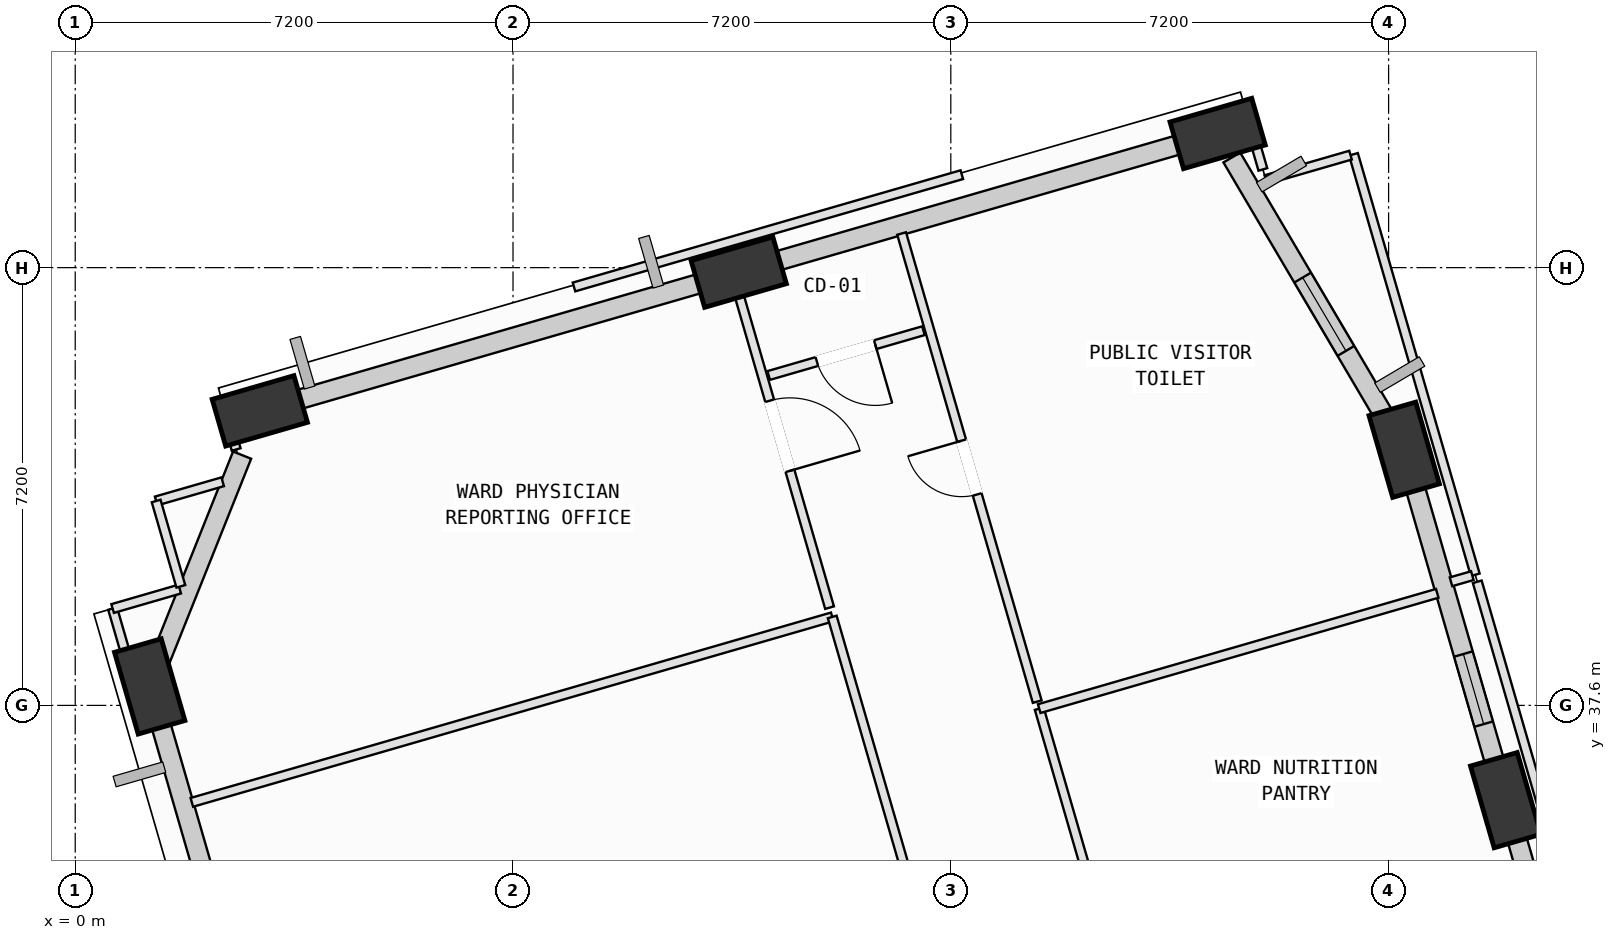
"""IFC4 building model, lengths in metres.
Left out: names, types, materials, properties, quantities, classifications, styles, units other than length and angle.
Written with IfcOpenShell. Run it as: python <this file> out.ifc"""

import sys

from ifc_helpers import new_model, si_unit, direction, frame, frame_2d, origin, origin_2d, place, context, subcontext, project, spatial, rectangle, extrude, element, fill, save


model = new_model("IFC4")
c1 = context("Model", 3, precision=1e-05, world=origin(), true_north=direction((0.0, 1.0)))
c2 = subcontext(c1, "Body", "Model", "MODEL_VIEW")
j1 = project(units=[si_unit("LENGTHUNIT", "METRE"), si_unit("PLANEANGLEUNIT", "RADIAN")], contexts=[c1])
p1 = place(None, origin())
s1 = spatial("IfcSite", under=j1, at=p1, CompositionType="ELEMENT")
p2 = place(p1, origin())
s2 = spatial("IfcBuilding", under=s1, at=p2, CompositionType="ELEMENT")
p3 = place(p2, frame((0.0, 0.0, 92.4)))
s3 = spatial("IfcBuildingStorey", under=s2, at=p3, CompositionType="ELEMENT", Elevation=92.4)
p4 = place(p3, frame((23.526, 36.041, 0.002), z_axis=(-0.046216520229, -0.042070447174, 0.998045144636), x_axis=(0.521685945625, 0.851022960879, 0.060030777066)))
e1 = element("IfcColumn", 1, at=p4, inside=s3, PredefinedType="COLUMN", context=c2, shape_type="SweptSolid", body=[
    extrude(rectangle(XDim=1.4, YDim=0.8, at=origin_2d()), origin(), (0.0, 0.0, 1.0), 4.004),
])
p5 = place(p3, frame((21.856, 41.804, 0.002), z_axis=(-0.069815910816, -0.049059829222, 0.996352784787), x_axis=(0.623114052348, 0.77782458417, 0.081962149972)))
e2 = element("IfcColumn", 2, at=p5, inside=s3, PredefinedType="COLUMN", context=c2, shape_type="SweptSolid", body=[
    extrude(rectangle(XDim=1.4, YDim=0.8, at=origin_2d()), origin(), (0.0, 0.0, 1.0), 4.011),
])
p6 = place(p3, frame((18.789, 47.006, 0.002), z_axis=(-0.091019912325, -0.061752669002, 0.993932584953), x_axis=(0.768058943677, -0.639647908294, 0.030594320596)))
e3 = element("IfcColumn", 3, at=p6, inside=s3, PredefinedType="COLUMN", context=c2, shape_type="SweptSolid", body=[
    extrude(rectangle(XDim=1.4, YDim=0.8, at=origin_2d()), origin(), (0.0, 0.0, 1.0), 4.021),
])
p7 = place(p3, frame((10.912, 44.726, 0.002), z_axis=(-0.081167514257, -0.094018532197, 0.992256191834), x_axis=(0.907432138666, -0.418775943189, 0.03454885123)))
e4 = element("IfcColumn", 4, at=p7, inside=s3, PredefinedType="COLUMN", context=c2, shape_type="SweptSolid", body=[
    extrude(rectangle(XDim=1.4, YDim=0.8, at=origin_2d()), origin(), (0.0, 0.0, 1.0), 4.028),
])
p8 = place(p3, frame((3.036, 42.445, 0.002), z_axis=(-0.071328120519, -0.125972714544, 0.989466105743), x_axis=(0.971456010571, -0.233777263949, 0.040266740449)))
e5 = element("IfcColumn", 5, at=p8, inside=s3, PredefinedType="COLUMN", context=c2, shape_type="SweptSolid", body=[
    extrude(rectangle(XDim=1.4, YDim=0.8, at=origin_2d()), origin(), (0.0, 0.0, 1.0), 4.039),
])
p9 = place(p3, frame((1.225, 37.912, 0.002), z_axis=(-0.052721586677, -0.133255019536, 0.989678500356), x_axis=(0.091085483074, 0.986283861971, 0.137650203007)))
e6 = element("IfcColumn", 6, at=p9, inside=s3, PredefinedType="COLUMN", context=c2, shape_type="SweptSolid", body=[
    extrude(rectangle(XDim=1.4, YDim=0.8, at=origin_2d()), origin(), (0.0, 0.0, 1.0), 4.038),
])
p10 = place(p3, frame((23.675, 35.524, 0.0), z_axis=(0.0, 0.0, 1.0), x_axis=(0.278160004848, -0.960534752991, 0.0)))
e7 = element("IfcWall", 7, at=p10, inside=s3, PredefinedType="SOLIDWALL", context=c2, shape_type="SweptSolid", body=[
    extrude(rectangle(XDim=6.223, YDim=0.32, at=frame_2d((3.111, 0.0))), origin(), (0.0, 0.0, 1.0), 3.165),
])
p11 = place(p10, frame((1.209, 0.0, 0.75)))
e8 = element("IfcOpeningElement", 8, at=p11, cuts=e7, PredefinedType="OPENING", context=c2, shape_type="SweptSolid", body=[
    extrude(rectangle(XDim=1.6, YDim=1.95, at=frame_2d((0.8, 0.975))), frame((0.0, 0.17, 0.0), z_axis=(0.0, -1.0, 0.0), x_axis=(1.0, 0.0, 0.0)), (0.0, 0.0, 1.0), 0.34),
])
p12 = place(p3, frame((22.003, 41.301, 0.0), z_axis=(0.0, 0.0, 1.0), x_axis=(0.278130894343, -0.960543182586, 0.0)))
e9 = element("IfcWall", 9, at=p12, inside=s3, PredefinedType="SOLIDWALL", context=c2, shape_type="SweptSolid", body=[
    extrude(rectangle(XDim=5.047, YDim=0.32, at=frame_2d((2.524, 0.0))), origin(), (0.0, 0.0, 1.0), 3.165),
])
p13 = place(p12, frame((2.973, 0.0, 0.75)))
e10 = element("IfcOpeningElement", 10, at=p13, cuts=e9, PredefinedType="OPENING", context=c2, shape_type="SweptSolid", body=[
    extrude(rectangle(XDim=1.2, YDim=1.75, at=frame_2d((0.6, 0.875))), frame((0.0, 0.17, 0.0), z_axis=(0.0, -1.0, 0.0), x_axis=(1.0, 0.0, 0.0)), (0.0, 0.0, 1.0), 0.34),
])
p14 = place(p3, frame((19.021, 46.612, 0.0), z_axis=(0.0, 0.0, 1.0), x_axis=(0.508026678392, -0.861341334223, 0.0)))
e11 = element("IfcWall", 11, at=p14, inside=s3, PredefinedType="SOLIDWALL", context=c2, shape_type="SweptSolid", body=[
    extrude(rectangle(XDim=5.129, YDim=0.32, at=frame_2d((2.564, 0.0))), origin(), (0.0, 0.0, 1.0), 3.165),
])
p15 = place(p14, frame((2.293, 0.0, 0.75)))
e12 = element("IfcOpeningElement", 12, at=p15, cuts=e11, PredefinedType="OPENING", context=c2, shape_type="SweptSolid", body=[
    extrude(rectangle(XDim=1.4, YDim=1.85, at=frame_2d((0.7, 0.925))), frame((0.0, 0.17, 0.0), z_axis=(0.0, -1.0, 0.0), x_axis=(1.0, 0.0, 0.0)), (0.0, 0.0, 1.0), 0.34),
])
p16 = place(p3, frame((11.169, 44.8, 0.0), z_axis=(0.0, 0.0, 1.0), x_axis=(0.960539342408, 0.278144156306, 0.0)))
e13 = element("IfcWall", 13, at=p16, inside=s3, PredefinedType="SOLIDWALL", context=c2, shape_type="SweptSolid", body=[
    extrude(rectangle(XDim=7.231, YDim=0.32, at=frame_2d((3.615, 0.0))), origin(), (0.0, 0.0, 1.0), 3.165),
])
p17 = place(p3, frame((3.269, 42.512, 0.0), z_axis=(0.0, 0.0, 1.0), x_axis=(0.960535698859, 0.278156738581, 0.0)))
e14 = element("IfcWall", 14, at=p17, inside=s3, PredefinedType="SOLIDWALL", context=c2, shape_type="SweptSolid", body=[
    extrude(rectangle(XDim=7.27, YDim=0.32, at=frame_2d((3.635, 0.0))), origin(), (0.0, 0.0, 1.0), 3.165),
])
p18 = place(p3, frame((1.302, 38.104, 0.0), z_axis=(0.0, 0.0, 1.0), x_axis=(0.371011883007, 0.928628118607, 0.0)))
e15 = element("IfcWall", 15, at=p18, inside=s3, PredefinedType="SOLIDWALL", context=c2, shape_type="SweptSolid", body=[
    extrude(rectangle(XDim=3.89, YDim=0.32, at=frame_2d((1.945, 0.0))), origin(), (0.0, 0.0, 1.0), 3.165),
])
p19 = place(p3, frame((2.935, 32.007, 0.0), z_axis=(0.0, 0.0, 1.0), x_axis=(-0.278171081154, 0.960531545349, 0.0)))
e16 = element("IfcWall", 16, at=p19, inside=s3, PredefinedType="SOLIDWALL", context=c2, shape_type="SweptSolid", body=[
    extrude(rectangle(XDim=5.456, YDim=0.32, at=frame_2d((2.728, 0.0))), origin(), (0.0, 0.0, 1.0), 3.165),
])
p20 = place(p19, frame((0.96, 0.0, 0.75)))
e17 = element("IfcOpeningElement", 17, at=p20, cuts=e16, PredefinedType="OPENING", context=c2, shape_type="SweptSolid", body=[
    extrude(rectangle(XDim=2.0, YDim=1.95, at=frame_2d((1.0, 0.975))), frame((0.0, 0.17, 0.0), z_axis=(0.0, -1.0, 0.0), x_axis=(1.0, 0.0, 0.0)), (0.0, 0.0, 1.0), 0.34),
])
p21 = place(p3, frame((1.918, 36.005, 0.0), z_axis=(0.0, 0.0, 1.0), x_axis=(0.960532175089, 0.278168906636, 0.0)))
e18 = element("IfcWall", 18, at=p21, inside=s3, PredefinedType="PARTITIONING", context=c2, shape_type="SweptSolid", body=[
    extrude(rectangle(XDim=10.965, YDim=0.15, at=frame_2d((5.482, 0.0))), origin(), (0.0, 0.0, 1.0), 3.78),
])
p22 = place(p3, frame((12.45, 39.055, 0.0), z_axis=(0.0, 0.0, 1.0), x_axis=(0.278173677599, -0.960530793411, 0.0)))
e19 = element("IfcWall", 19, at=p22, inside=s3, PredefinedType="PARTITIONING", context=c2, shape_type="SweptSolid", body=[
    extrude(rectangle(XDim=11.64, YDim=0.15, at=frame_2d((5.82, 0.0))), origin(), (0.0, 0.0, 1.0), 3.78),
])
p23 = place(p22, frame((5.22, 0.0, 0.0)))
e20 = element("IfcOpeningElement", 20, at=p23, cuts=e19, PredefinedType="OPENING", context=c2, shape_type="SweptSolid", body=[
    extrude(rectangle(XDim=1.2, YDim=2.15, at=frame_2d((0.6, 1.075))), frame((0.0, 0.085, 0.0), z_axis=(0.0, -1.0, 0.0), x_axis=(1.0, 0.0, 0.0)), (0.0, 0.0, 1.0), 0.17),
])
p24 = place(p3, frame((1.331, 40.962, 0.0), z_axis=(0.0, 0.0, 1.0), x_axis=(0.960686230917, 0.277636391216, 0.0)))
e21 = element("IfcWall", 21, at=p24, inside=s3, PredefinedType="PARTITIONING", context=c2, shape_type="SweptSolid", body=[
    extrude(rectangle(XDim=1.139, YDim=0.15, at=frame_2d((0.569, 0.0))), origin(), (0.0, 0.0, 1.0), 3.78),
])
p25 = place(p3, frame((2.647, 41.809, 0.0), z_axis=(0.0, 0.0, 1.0), x_axis=(-0.278075705732, 0.960559161052, 0.0)))
e22 = element("IfcWall", 22, at=p25, inside=s3, PredefinedType="PARTITIONING", context=c2, shape_type="SweptSolid", body=[
    extrude(rectangle(XDim=0.673, YDim=0.15, at=frame_2d((0.336, 0.0))), origin(), (0.0, 0.0, 1.0), 2.965),
])
p26 = place(p3, frame((2.46, 42.455, 0.0), z_axis=(0.0, 0.0, 1.0), x_axis=(0.960436547208, 0.278498902667, 0.0)))
e23 = element("IfcWall", 23, at=p26, inside=s3, PredefinedType="PARTITIONING", context=c2, shape_type="SweptSolid", body=[
    extrude(rectangle(XDim=0.793, YDim=0.15, at=frame_2d((0.397, 0.0))), origin(), (0.0, 0.0, 1.0), 3.78),
])
p27 = place(p3, frame((10.205, 44.698, 0.0), z_axis=(0.0, 0.0, 1.0), x_axis=(0.960640226242, 0.277795528628, 0.0)))
e24 = element("IfcWall", 24, at=p27, inside=s3, PredefinedType="PARTITIONING", context=c2, shape_type="SweptSolid", body=[
    extrude(rectangle(XDim=0.587, YDim=0.15, at=frame_2d((0.293, 0.0))), origin(), (0.0, 0.0, 1.0), 3.78),
])
p28 = place(p3, frame((10.769, 44.861, 0.0), z_axis=(0.0, 0.0, 1.0), x_axis=(0.278143692162, -0.96053947681, 0.0)))
e25 = element("IfcWall", 25, at=p28, inside=s3, PredefinedType="PARTITIONING", context=c2, shape_type="SweptSolid", body=[
    extrude(rectangle(XDim=5.885, YDim=0.15, at=frame_2d((2.943, 0.0))), origin(), (0.0, 0.0, 1.0), 2.965),
])
p29 = place(p28, frame((2.343, 0.0, 0.0)))
e26 = element("IfcOpeningElement", 26, at=p29, cuts=e25, PredefinedType="OPENING", context=c2, shape_type="SweptSolid", body=[
    extrude(rectangle(XDim=1.2, YDim=2.15, at=frame_2d((0.6, 1.075))), frame((0.0, 0.085, 0.0), z_axis=(0.0, -1.0, 0.0), x_axis=(1.0, 0.0, 0.0)), (0.0, 0.0, 1.0), 0.17),
])
p30 = place(p3, frame((1.197, 37.183, 0.0), z_axis=(0.0, 0.0, 1.0), x_axis=(-0.278140228785, 0.960540479694, 0.0)))
e27 = element("IfcWall", 27, at=p30, inside=s3, PredefinedType="PARTITIONING", context=c2, shape_type="SweptSolid", body=[
    extrude(rectangle(XDim=2.093, YDim=0.15, at=frame_2d((1.046, 0.0))), origin(), (0.0, 0.0, 1.0), 3.165),
])
p31 = place(p3, frame((0.615, 39.193, 0.0), z_axis=(0.0, 0.0, 1.0), x_axis=(0.960507511892, 0.278254055855, 0.0)))
e28 = element("IfcWall", 28, at=p31, inside=s3, PredefinedType="PARTITIONING", context=c2, shape_type="SweptSolid", body=[
    extrude(rectangle(XDim=1.149, YDim=0.15, at=frame_2d((0.575, 0.0))), origin(), (0.0, 0.0, 1.0), 3.78),
])
p32 = place(p3, frame((1.737, 39.558, 0.0), z_axis=(0.0, 0.0, 1.0), x_axis=(-0.277830901588, 0.960629996472, 0.0)))
e29 = element("IfcWall", 29, at=p32, inside=s3, PredefinedType="PARTITIONING", context=c2, shape_type="SweptSolid", body=[
    extrude(rectangle(XDim=1.461, YDim=0.15, at=frame_2d((0.731, 0.0))), origin(), (0.0, 0.0, 1.0), 3.78),
])
p33 = place(p3, frame((18.174, 29.536, 0.0), z_axis=(0.0, 0.0, 1.0), x_axis=(-0.278171795837, 0.960531338375, 0.0)))
e30 = element("IfcWall", 30, at=p33, inside=s3, PredefinedType="PARTITIONING", context=c2, shape_type="SweptSolid", body=[
    extrude(rectangle(XDim=8.34, YDim=0.15, at=frame_2d((4.17, 0.0))), origin(), (0.0, 0.0, 1.0), 3.78),
])
p34 = place(p33, frame((3.71, 0.0, 0.0)))
e31 = element("IfcOpeningElement", 31, at=p34, cuts=e30, PredefinedType="OPENING", context=c2, shape_type="SweptSolid", body=[
    extrude(rectangle(XDim=0.92, YDim=2.1, at=frame_2d((0.46, 1.05))), frame((0.0, 0.085, 0.0), z_axis=(0.0, -1.0, 0.0), x_axis=(1.0, 0.0, 0.0)), (0.0, 0.0, 1.0), 0.17),
])
p35 = place(p3, frame((15.854, 37.547, 0.0), z_axis=(0.0, 0.0, 1.0), x_axis=(0.960519935436, 0.278211167335, 0.0)))
e32 = element("IfcWall", 32, at=p35, inside=s3, PredefinedType="PARTITIONING", context=c2, shape_type="SweptSolid", body=[
    extrude(rectangle(XDim=6.815, YDim=0.15, at=frame_2d((3.407, 0.0))), origin(), (0.0, 0.0, 1.0), 3.78),
])
p36 = place(p3, frame((23.058, 39.633, 0.0), z_axis=(0.0, 0.0, 1.0), x_axis=(0.278152609406, -0.960536894596, 0.0)))
e33 = element("IfcWall", 33, at=p36, inside=s3, PredefinedType="PARTITIONING", context=c2, shape_type="SweptSolid", body=[
    extrude(rectangle(XDim=8.34, YDim=0.15, at=frame_2d((4.17, 0.0))), origin(), (0.0, 0.0, 1.0), 3.78),
])
p37 = place(p3, frame((21.022, 46.664, 0.0), z_axis=(0.0, 0.0, 1.0), x_axis=(0.278176631297, -0.960529938003, 0.0)))
e34 = element("IfcWall", 34, at=p37, inside=s3, PredefinedType="PARTITIONING", context=c2, shape_type="SweptSolid", body=[
    extrude(rectangle(XDim=7.2, YDim=0.15, at=frame_2d((3.6, 0.0))), origin(), (0.0, 0.0, 1.0), 3.78),
])
p38 = place(p3, frame((22.977, 39.734, 0.0), z_axis=(0.0, 0.0, 1.0), x_axis=(-0.961144701931, -0.27604503609, 0.0)))
e35 = element("IfcWall", 35, at=p38, inside=s3, PredefinedType="PARTITIONING", context=c2, shape_type="SweptSolid", body=[
    extrude(rectangle(XDim=0.365, YDim=0.15, at=frame_2d((0.183, 0.0))), origin(), (0.0, 0.0, 1.0), 3.78),
])
p39 = place(p3, frame((15.821, 37.662, 0.0), z_axis=(0.0, 0.0, 1.0), x_axis=(-0.278211165239, 0.960519936043, 0.0)))
e36 = element("IfcWall", 36, at=p39, inside=s3, PredefinedType="PARTITIONING", context=c2, shape_type="SweptSolid", body=[
    extrude(rectangle(XDim=8.015, YDim=0.15, at=frame_2d((4.008, 0.0))), origin(), (0.0, 0.0, 1.0), 3.78),
])
p40 = place(p39, frame((3.548, 0.0, 0.0)))
e37 = element("IfcOpeningElement", 37, at=p40, cuts=e36, PredefinedType="OPENING", context=c2, shape_type="SweptSolid", body=[
    extrude(rectangle(XDim=0.92, YDim=2.1, at=frame_2d((0.46, 1.05))), frame((0.0, 0.085, 0.0), z_axis=(0.0, -1.0, 0.0), x_axis=(1.0, 0.0, 0.0)), (0.0, 0.0, 1.0), 0.17),
])
p41 = place(p3, frame((18.062, 46.994, 0.0), z_axis=(0.0, 0.0, 1.0), x_axis=(0.960516252311, 0.278223882956, 0.0)))
e38 = element("IfcWall", 38, at=p41, inside=s3, PredefinedType="PARTITIONING", context=c2, shape_type="SweptSolid", body=[
    extrude(rectangle(XDim=1.251, YDim=0.15, at=frame_2d((0.625, 0.0))), origin(), (0.0, 0.0, 1.0), 3.165),
])
p42 = place(p3, frame((19.278, 47.294, 0.0), z_axis=(0.0, 0.0, 1.0), x_axis=(0.277539652821, -0.960714182841, 0.0)))
e39 = element("IfcWall", 39, at=p42, inside=s3, PredefinedType="PARTITIONING", context=c2, shape_type="SweptSolid", body=[
    extrude(rectangle(XDim=0.915, YDim=0.15, at=frame_2d((0.458, 0.0))), origin(), (0.0, 0.0, 1.0), 3.78),
])
p43 = place(p3, frame((19.581, 46.247, 0.0), z_axis=(0.0, 0.0, 1.0), x_axis=(0.960642326739, 0.27778826483, 0.0)))
e40 = element("IfcWall", 40, at=p43, inside=s3, PredefinedType="PARTITIONING", context=c2, shape_type="SweptSolid", body=[
    extrude(rectangle(XDim=1.45, YDim=0.15, at=frame_2d((0.725, 0.0))), origin(), (0.0, 0.0, 1.0), 3.78),
])
p44 = place(p3, frame((13.95, 43.763, 0.0), z_axis=(0.0, 0.0, 1.0), x_axis=(-0.960526690824, -0.2781878434, 0.0)))
e41 = element("IfcWall", 41, at=p44, inside=s3, PredefinedType="PARTITIONING", context=c2, shape_type="SweptSolid", body=[
    extrude(rectangle(XDim=2.649, YDim=0.15, at=frame_2d((1.325, 0.0))), origin(), (0.0, 0.0, 1.0), 3.78),
])
p45 = place(p44, frame((0.825, 0.0, 0.0)))
e42 = element("IfcOpeningElement", 42, at=p45, cuts=e41, PredefinedType="OPENING", context=c2, shape_type="SweptSolid", body=[
    extrude(rectangle(XDim=1.0, YDim=2.12, at=frame_2d((0.5, 1.06))), frame((0.0, 0.085, 0.0), z_axis=(0.0, -1.0, 0.0), x_axis=(1.0, 0.0, 0.0)), (0.0, 0.0, 1.0), 0.17),
])
p46 = place(p3, frame((8.203, 44.482, 0.0), z_axis=(0.0, 0.0, 1.0), x_axis=(0.960529886678, 0.278176808521, 0.0)))
e43 = element("IfcWall", 43, at=p46, inside=s3, PredefinedType="PARTITIONING", context=c2, shape_type="SweptSolid", body=[
    extrude(rectangle(XDim=6.64, YDim=0.15, at=frame_2d((3.32, 0.0))), origin(), (0.0, 0.0, 1.0), 3.78),
])
p47 = place(p13, origin())
e44 = element("IfcWindow", 44, at=p47, inside=s3, PartitioningType="SINGLE_PANEL", PredefinedType="WINDOW", context=c2, shape_type="SweptSolid", body=[
    extrude(rectangle(XDim=1.2, YDim=1.75, at=frame_2d((0.6, 0.875))), frame((0.0, 0.03, 0.0), z_axis=(0.0, -1.0, 0.0), x_axis=(1.0, 0.0, 0.0)), (0.0, 0.0, 1.0), 0.06),
])
fill(e10, e44)
p48 = place(p15, origin())
e45 = element("IfcWindow", 45, at=p48, inside=s3, PartitioningType="SINGLE_PANEL", PredefinedType="WINDOW", context=c2, shape_type="SweptSolid", body=[
    extrude(rectangle(XDim=1.4, YDim=1.85, at=frame_2d((0.7, 0.925))), frame((0.0, 0.03, 0.0), z_axis=(0.0, -1.0, 0.0), x_axis=(1.0, 0.0, 0.0)), (0.0, 0.0, 1.0), 0.06),
])
fill(e12, e45)
p49 = place(p29, origin())
e46 = element("IfcDoor", 46, at=p49, inside=s3, OperationType="SINGLE_SWING_RIGHT", PredefinedType="DOOR", context=c2, shape_type="SweptSolid", body=[
    extrude(rectangle(XDim=1.2, YDim=2.15, at=frame_2d((0.6, 1.075))), frame((0.0, 0.025, 0.0), z_axis=(0.0, -1.0, 0.0), x_axis=(1.0, 0.0, 0.0)), (0.0, 0.0, 1.0), 0.05),
])
fill(e26, e46)
p50 = place(p40, origin())
e47 = element("IfcDoor", 47, at=p50, inside=s3, OperationType="SINGLE_SWING_RIGHT", PredefinedType="DOOR", context=c2, shape_type="SweptSolid", body=[
    extrude(rectangle(XDim=0.92, YDim=2.1, at=frame_2d((0.46, 1.05))), frame((0.0, 0.025, 0.0), z_axis=(0.0, -1.0, 0.0), x_axis=(1.0, 0.0, 0.0)), (0.0, 0.0, 1.0), 0.05),
])
fill(e37, e47)
p51 = place(p45, origin())
e48 = element("IfcDoor", 48, at=p51, inside=s3, OperationType="SINGLE_SWING_LEFT", PredefinedType="DOOR", context=c2, shape_type="SweptSolid", body=[
    extrude(rectangle(XDim=1.0, YDim=2.12, at=frame_2d((0.5, 1.06))), frame((0.0, 0.025, 0.0), z_axis=(0.0, -1.0, 0.0), x_axis=(1.0, 0.0, 0.0)), (0.0, 0.0, 1.0), 0.05),
])
fill(e42, e48)
save(model, sys.argv[1])
